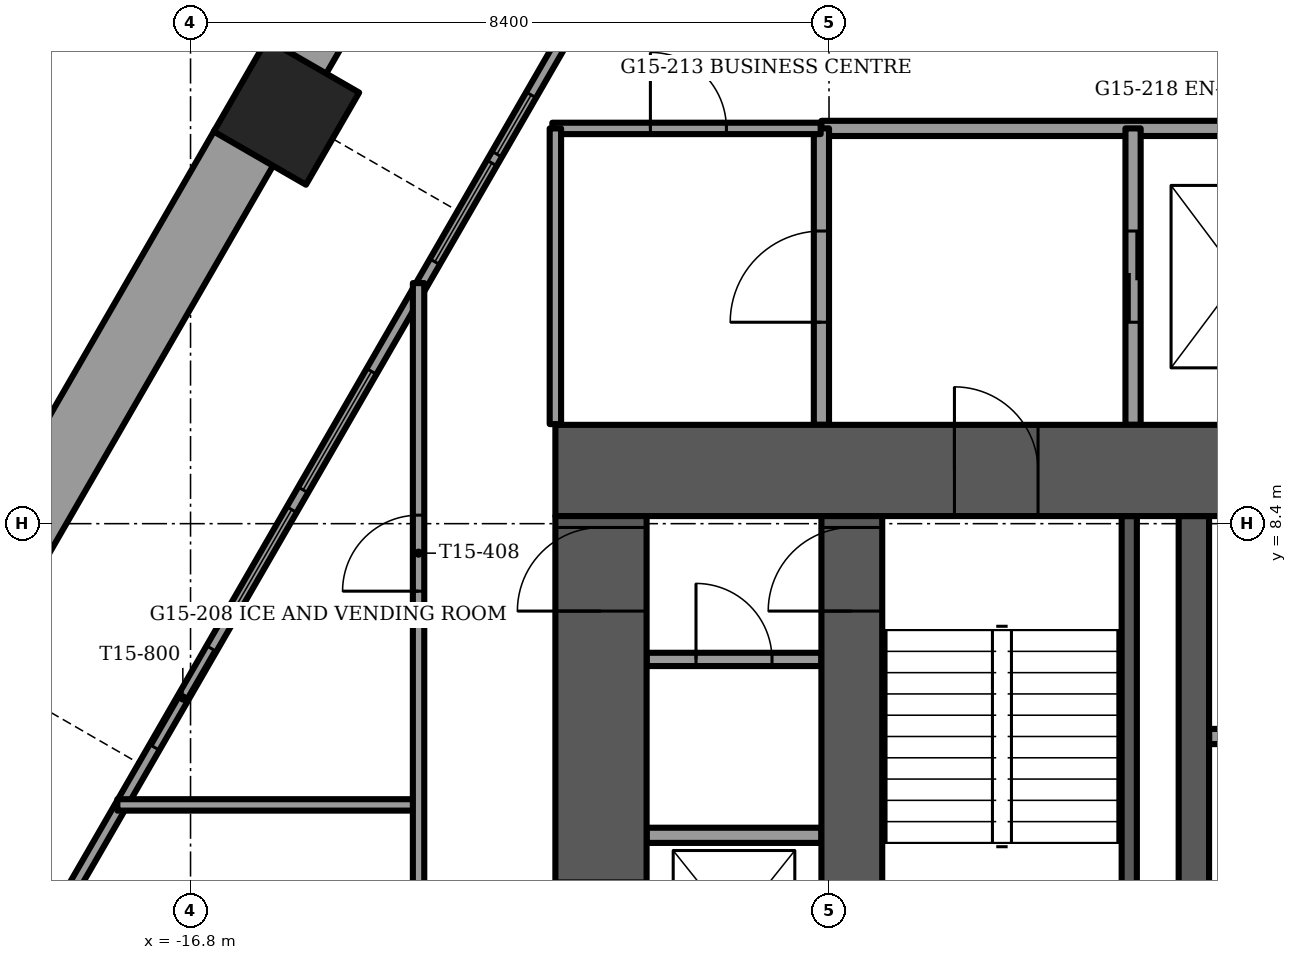
"""IFC4 building model, lengths in metres.
Left out: names, types, materials, properties, quantities, classifications, styles, units other than length and angle.
Written with IfcOpenShell. Run it as: python <this file> out.ifc"""

import sys

from ifc_helpers import new_model, si_unit, direction, frame, frame_2d, origin, origin_2d, place, context, subcontext, project, spatial, rectangle, extrude, element, fill, save


model = new_model("IFC4")
c1 = context("Model", 3, precision=1e-05, world=origin(), true_north=direction((0.0, 1.0)))
c2 = subcontext(c1, "Body", "Model", "MODEL_VIEW")
j1 = project(units=[si_unit("LENGTHUNIT", "METRE"), si_unit("PLANEANGLEUNIT", "RADIAN")], contexts=[c1])
p1 = place(None, origin())
s1 = spatial("IfcSite", under=j1, at=p1, CompositionType="ELEMENT")
p2 = place(p1, origin())
s2 = spatial("IfcBuilding", under=s1, at=p2, CompositionType="ELEMENT")
p3 = place(p2, frame((0.0, 0.0, 61.75)))
s3 = spatial("IfcBuildingStorey", under=s2, at=p3, CompositionType="ELEMENT", Elevation=61.75)
p4 = place(p3, frame((-15.538, 13.815, -1.2), z_axis=(0.0, 0.0, 1.0), x_axis=(0.5, 0.866025403784, 0.0)))
e1 = element("IfcColumn", 1, at=p4, inside=s3, PredefinedType="COLUMN", context=c2, shape_type="SweptSolid", body=[
    extrude(rectangle(XDim=1.4, YDim=1.4, at=origin_2d()), origin(), (0.0, 0.0, 1.0), 3.75),
])
p5 = place(p3, frame((-12.0, 9.1, -0.3), z_axis=(0.0, 0.0, 1.0), x_axis=(1.0, 0.0, 0.0)))
e2 = element("IfcWall", 2, at=p5, inside=s3, PredefinedType="SHEAR", context=c2, shape_type="SweptSolid", body=[
    extrude(rectangle(XDim=24.0, YDim=1.2, at=frame_2d((12.0, 0.0))), origin(), (0.0, 0.0, 1.0), 3.75),
])
p6 = place(p5, frame((11.2, 0.0, 0.0)))
e3 = element("IfcOpeningElement", 3, at=p6, cuts=e2, PredefinedType="OPENING", context=c2, shape_type="SweptSolid", body=[
    extrude(rectangle(XDim=1.6, YDim=2.1, at=frame_2d((0.8, 1.05))), frame((0.0, 0.6, 0.0), z_axis=(0.0, -1.0, 0.0), x_axis=(1.0, 0.0, 0.0)), (0.0, 0.0, 1.0), 1.2),
])
p7 = place(p5, frame((5.25, 0.0, 0.0)))
e4 = element("IfcOpeningElement", 4, at=p7, cuts=e2, PredefinedType="OPENING", context=c2, shape_type="SweptSolid", body=[
    extrude(rectangle(XDim=1.1, YDim=2.1, at=frame_2d((0.55, 1.05))), frame((0.0, 0.6, 0.0), z_axis=(0.0, -1.0, 0.0), x_axis=(1.0, 0.0, 0.0)), (0.0, 0.0, 1.0), 1.2),
])
p8 = place(p5, frame((17.65, 0.0, 0.0)))
e5 = element("IfcOpeningElement", 5, at=p8, cuts=e2, PredefinedType="OPENING", context=c2, shape_type="SweptSolid", body=[
    extrude(rectangle(XDim=1.1, YDim=2.1, at=frame_2d((0.55, 1.05))), frame((0.0, 0.6, 0.0), z_axis=(0.0, -1.0, 0.0), x_axis=(1.0, 0.0, 0.0)), (0.0, 0.0, 1.0), 1.2),
])
p9 = place(p3, frame((-8.1, -0.5, -0.3), z_axis=(0.0, 0.0, 1.0), x_axis=(0.0, 1.0, 0.0)))
e6 = element("IfcWall", 6, at=p9, inside=s3, PredefinedType="SHEAR", context=c2, shape_type="SweptSolid", body=[
    extrude(rectangle(XDim=9.0, YDim=0.8, at=frame_2d((4.5, 0.0))), origin(), (0.0, 0.0, 1.0), 3.75),
])
p10 = place(p9, frame((7.75, 0.0, 0.0)))
e7 = element("IfcOpeningElement", 7, at=p10, cuts=e6, PredefinedType="OPENING", context=c2, shape_type="SweptSolid", body=[
    extrude(rectangle(XDim=1.1, YDim=2.1, at=frame_2d((0.55, 1.05))), frame((0.0, 0.4, 0.0), z_axis=(0.0, -1.0, 0.0), x_axis=(1.0, 0.0, 0.0)), (0.0, 0.0, 1.0), 0.8),
])
p11 = place(p3, frame((-3.6, -0.5, -0.3), z_axis=(0.0, 0.0, 1.0), x_axis=(0.0, 1.0, 0.0)))
e8 = element("IfcWall", 8, at=p11, inside=s3, PredefinedType="SHEAR", context=c2, shape_type="SweptSolid", body=[
    extrude(rectangle(XDim=9.0, YDim=0.4, at=frame_2d((4.5, 0.0))), origin(), (0.0, 0.0, 1.0), 3.75),
])
p12 = place(p3, frame((-11.4, -0.5, -0.3), z_axis=(0.0, 0.0, 1.0), x_axis=(0.0, 1.0, 0.0)))
e9 = element("IfcWall", 9, at=p12, inside=s3, PredefinedType="SHEAR", context=c2, shape_type="SweptSolid", body=[
    extrude(rectangle(XDim=9.0, YDim=1.2, at=frame_2d((4.5, 0.0))), origin(), (0.0, 0.0, 1.0), 3.75),
])
p13 = place(p12, frame((7.75, 0.0, 0.0)))
e10 = element("IfcOpeningElement", 10, at=p13, cuts=e9, PredefinedType="OPENING", context=c2, shape_type="SweptSolid", body=[
    extrude(rectangle(XDim=1.1, YDim=2.1, at=frame_2d((0.55, 1.05))), frame((0.0, 0.6, 0.0), z_axis=(0.0, -1.0, 0.0), x_axis=(1.0, 0.0, 0.0)), (0.0, 0.0, 1.0), 1.2),
])
p14 = place(p12, frame((0.55, 0.0, 0.0)))
e11 = element("IfcOpeningElement", 11, at=p14, cuts=e9, PredefinedType="OPENING", context=c2, shape_type="SweptSolid", body=[
    extrude(rectangle(XDim=1.2, YDim=2.1, at=frame_2d((0.6, 1.05))), frame((0.0, 0.6, 0.0), z_axis=(0.0, -1.0, 0.0), x_axis=(1.0, 0.0, 0.0)), (0.0, 0.0, 1.0), 1.2),
])
p15 = place(p12, frame((3.0, 0.0, 0.0)))
e12 = element("IfcOpeningElement", 12, at=p15, cuts=e9, PredefinedType="OPENING", context=c2, shape_type="SweptSolid", body=[
    extrude(rectangle(XDim=1.2, YDim=2.1, at=frame_2d((0.6, 1.05))), frame((0.0, 0.6, 0.0), z_axis=(0.0, -1.0, 0.0), x_axis=(1.0, 0.0, 0.0)), (0.0, 0.0, 1.0), 1.2),
])
p16 = place(p3, frame((-11.855, 20.694, 0.0), z_axis=(0.0, 0.0, 1.0), x_axis=(-0.500013966327, -0.866017340172, 0.0)))
e13 = element("IfcWall", 13, at=p16, inside=s3, PredefinedType="PARAPET", context=c2, shape_type="SweptSolid", body=[
    extrude(rectangle(XDim=7.129, YDim=0.9, at=frame_2d((3.564, 0.0))), origin(), (0.0, 0.0, 1.0), 1.1),
])
p17 = place(p3, frame((-16.089, 13.36, 0.0), z_axis=(0.0, 0.0, 1.0), x_axis=(-0.499997206141, -0.866027016814, 0.0)))
e14 = element("IfcWall", 14, at=p17, inside=s3, PredefinedType="PARAPET", context=c2, shape_type="SweptSolid", body=[
    extrude(rectangle(XDim=7.051, YDim=0.9, at=frame_2d((3.525, 0.0))), origin(), (0.0, 0.0, 1.0), 1.1),
])
p18 = place(p3, frame((-8.709, 20.292, 0.0), z_axis=(0.0, 0.0, 1.0), x_axis=(-0.500005515081, -0.866022219628, 0.0)))
e15 = element("IfcWall", 15, at=p18, inside=s3, PredefinedType="SOLIDWALL", context=c2, shape_type="SweptSolid", body=[
    extrude(rectangle(XDim=23.667, YDim=0.15, at=frame_2d((11.833, 0.0))), origin(), (0.0, 0.0, 1.0), 3.45),
])
p19 = place(p18, frame((3.825, 0.0, 0.15)))
e16 = element("IfcOpeningElement", 16, at=p19, cuts=e15, PredefinedType="OPENING", context=c2, shape_type="SweptSolid", body=[
    extrude(rectangle(XDim=1.5, YDim=2.85, at=frame_2d((0.75, 1.425))), frame((0.0, 0.075, 0.0), z_axis=(0.0, -1.0, 0.0), x_axis=(1.0, 0.0, 0.0)), (0.0, 0.0, 1.0), 0.15),
])
p20 = place(p18, frame((7.219, 0.0, 0.15)))
e17 = element("IfcOpeningElement", 17, at=p20, cuts=e15, PredefinedType="OPENING", context=c2, shape_type="SweptSolid", body=[
    extrude(rectangle(XDim=0.9, YDim=2.85, at=frame_2d((0.45, 1.425))), frame((0.0, 0.075, 0.0), z_axis=(0.0, -1.0, 0.0), x_axis=(1.0, 0.0, 0.0)), (0.0, 0.0, 1.0), 0.15),
])
p21 = place(p18, frame((8.254, 0.0, 0.15)))
e18 = element("IfcOpeningElement", 18, at=p21, cuts=e15, PredefinedType="OPENING", context=c2, shape_type="SweptSolid", body=[
    extrude(rectangle(XDim=1.5, YDim=2.85, at=frame_2d((0.75, 1.425))), frame((0.0, 0.075, 0.0), z_axis=(0.0, -1.0, 0.0), x_axis=(1.0, 0.0, 0.0)), (0.0, 0.0, 1.0), 0.15),
])
p22 = place(p18, frame((11.419, 0.0, 0.15)))
e19 = element("IfcOpeningElement", 19, at=p22, cuts=e15, PredefinedType="OPENING", context=c2, shape_type="SweptSolid", body=[
    extrude(rectangle(XDim=1.8, YDim=2.85, at=frame_2d((0.9, 1.425))), frame((0.0, 0.075, 0.0), z_axis=(0.0, -1.0, 0.0), x_axis=(1.0, 0.0, 0.0)), (0.0, 0.0, 1.0), 0.15),
])
p23 = place(p18, frame((13.519, 0.0, 0.15)))
e20 = element("IfcOpeningElement", 20, at=p23, cuts=e15, PredefinedType="OPENING", context=c2, shape_type="SweptSolid", body=[
    extrude(rectangle(XDim=1.5, YDim=2.85, at=frame_2d((0.75, 1.425))), frame((0.0, 0.075, 0.0), z_axis=(0.0, -1.0, 0.0), x_axis=(1.0, 0.0, 0.0)), (0.0, 0.0, 1.0), 0.15),
])
p24 = place(p18, frame((15.63, 0.0, 0.0)))
e21 = element("IfcOpeningElement", 21, at=p24, cuts=e15, PredefinedType="OPENING", context=c2, shape_type="SweptSolid", body=[
    extrude(rectangle(XDim=1.5, YDim=2.4, at=frame_2d((0.75, 1.2))), frame((0.0, 0.075, 0.0), z_axis=(0.0, -1.0, 0.0), x_axis=(1.0, 0.0, 0.0)), (0.0, 0.0, 1.0), 0.15),
])
p25 = place(p18, frame((0.41, 0.0, 0.15)))
e22 = element("IfcOpeningElement", 22, at=p25, cuts=e15, PredefinedType="OPENING", context=c2, shape_type="SweptSolid", body=[
    extrude(rectangle(XDim=1.8, YDim=2.73, at=frame_2d((0.9, 1.365))), frame((0.0, 0.075, 0.0), z_axis=(0.0, -1.0, 0.0), x_axis=(1.0, 0.0, 0.0)), (0.0, 0.0, 1.0), 0.15),
])
p26 = place(p18, frame((20.743, 0.0, 0.15)))
e23 = element("IfcOpeningElement", 23, at=p26, cuts=e15, PredefinedType="OPENING", context=c2, shape_type="SweptSolid", body=[
    extrude(rectangle(XDim=1.8, YDim=2.73, at=frame_2d((0.9, 1.365))), frame((0.0, 0.075, 0.0), z_axis=(0.0, -1.0, 0.0), x_axis=(1.0, 0.0, 0.0)), (0.0, 0.0, 1.0), 0.15),
])
p27 = place(p3, frame((-3.4, 5.6, 0.0), z_axis=(0.0, 0.0, 1.0), x_axis=(1.0, 0.0, 0.0)))
e24 = element("IfcWall", 24, at=p27, inside=s3, PredefinedType="PARTITIONING", context=c2, shape_type="SweptSolid", body=[
    extrude(rectangle(XDim=2.3, YDim=0.2, at=frame_2d((1.15, 0.0))), origin(), (0.0, 0.0, 1.0), 3.45),
])
p28 = place(p3, frame((-4.45, 0.9, -0.3), z_axis=(0.0, 0.0, 1.0), x_axis=(0.0, 1.0, 0.0)))
e25 = element("IfcWall", 25, at=p28, inside=s3, PredefinedType="SOLIDWALL", context=c2, shape_type="SweptSolid", body=[
    extrude(rectangle(XDim=7.6, YDim=0.2, at=frame_2d((3.8, 0.0))), origin(), (0.0, 0.0, 1.0), 3.75),
])
p29 = place(p3, frame((-8.5, 13.6, 0.0), z_axis=(0.0, 0.0, 1.0), x_axis=(1.0, 0.0, 0.0)))
e26 = element("IfcWall", 26, at=p29, inside=s3, PredefinedType="PARTITIONING", context=c2, shape_type="SweptSolid", body=[
    extrude(rectangle(XDim=17.0, YDim=0.2, at=frame_2d((8.5, 0.0))), origin(), (0.0, 0.0, 1.0), 3.45),
])
p30 = place(p29, frame((8.0, 0.0, 0.0)))
e27 = element("IfcOpeningElement", 27, at=p30, cuts=e26, PredefinedType="OPENING", context=c2, shape_type="SweptSolid", body=[
    extrude(rectangle(XDim=1.0, YDim=2.1, at=frame_2d((0.5, 1.05))), frame((0.0, 0.1, 0.0), z_axis=(0.0, -1.0, 0.0), x_axis=(1.0, 0.0, 0.0)), (0.0, 0.0, 1.0), 0.2),
])
p31 = place(p3, frame((-8.5, 9.7, 0.0), z_axis=(0.0, 0.0, 1.0), x_axis=(0.0, 1.0, 0.0)))
e28 = element("IfcWall", 28, at=p31, inside=s3, PredefinedType="PARTITIONING", context=c2, shape_type="SweptSolid", body=[
    extrude(rectangle(XDim=3.9, YDim=0.2, at=frame_2d((1.95, 0.0))), origin(), (0.0, 0.0, 1.0), 3.45),
])
p32 = place(p31, frame((1.35, 0.0, 0.0)))
e29 = element("IfcOpeningElement", 29, at=p32, cuts=e28, PredefinedType="OPENING", context=c2, shape_type="SweptSolid", body=[
    extrude(rectangle(XDim=1.2, YDim=2.1, at=frame_2d((0.6, 1.05))), frame((0.0, 0.1, 0.0), z_axis=(0.0, -1.0, 0.0), x_axis=(1.0, 0.0, 0.0)), (0.0, 0.0, 1.0), 0.2),
])
p33 = place(p3, frame((-4.4, 9.7, 0.0), z_axis=(0.0, 0.0, 1.0), x_axis=(0.0, 1.0, 0.0)))
e30 = element("IfcWall", 30, at=p33, inside=s3, PredefinedType="PARTITIONING", context=c2, shape_type="SweptSolid", body=[
    extrude(rectangle(XDim=3.9, YDim=0.2, at=frame_2d((1.95, 0.0))), origin(), (0.0, 0.0, 1.0), 3.45),
])
p34 = place(p33, frame((1.35, 0.0, 0.0)))
e31 = element("IfcOpeningElement", 31, at=p34, cuts=e30, PredefinedType="OPENING", context=c2, shape_type="SweptSolid", body=[
    extrude(rectangle(XDim=1.2, YDim=2.1, at=frame_2d((0.6, 1.05))), frame((0.0, 0.1, 0.0), z_axis=(0.0, -1.0, 0.0), x_axis=(1.0, 0.0, 0.0)), (0.0, 0.0, 1.0), 0.2),
])
p35 = place(p3, frame((-10.8, 4.3, 0.0), z_axis=(0.0, 0.0, 1.0), x_axis=(1.0, 0.0, 0.0)))
e32 = element("IfcWall", 32, at=p35, inside=s3, PredefinedType="PARTITIONING", context=c2, shape_type="SweptSolid", body=[
    extrude(rectangle(XDim=2.3, YDim=0.2, at=frame_2d((1.15, 0.0))), origin(), (0.0, 0.0, 1.0), 3.45),
])
p36 = place(p3, frame((-10.8, 6.614, 0.0), z_axis=(0.0, 0.0, 1.0), x_axis=(1.0, 0.0, 0.0)))
e33 = element("IfcWall", 33, at=p36, inside=s3, PredefinedType="PARTITIONING", context=c2, shape_type="SweptSolid", body=[
    extrude(rectangle(XDim=2.3, YDim=0.175, at=frame_2d((1.15, 0.0))), origin(), (0.0, 0.0, 1.0), 3.45),
])
p37 = place(p36, frame((0.65, 0.0, 0.0)))
e34 = element("IfcOpeningElement", 34, at=p37, cuts=e33, PredefinedType="OPENING", context=c2, shape_type="SweptSolid", body=[
    extrude(rectangle(XDim=1.0, YDim=2.1, at=frame_2d((0.5, 1.05))), frame((0.0, 0.087, 0.0), z_axis=(0.0, -1.0, 0.0), x_axis=(1.0, 0.0, 0.0)), (0.0, 0.0, 1.0), 0.175),
])
p38 = place(p3, frame((-17.763, 4.7, 0.0), z_axis=(0.0, 0.0, 1.0), x_axis=(1.0, 0.0, 0.0)))
e35 = element("IfcWall", 35, at=p38, inside=s3, PredefinedType="PARTITIONING", context=c2, shape_type="SweptSolid", body=[
    extrude(rectangle(XDim=3.963, YDim=0.15, at=frame_2d((1.981, 0.0))), origin(), (0.0, 0.0, 1.0), 3.45),
])
p39 = place(p3, frame((-12.04, 13.6, 0.0), z_axis=(0.0, 0.0, 1.0), x_axis=(1.0, 0.0, 0.0)))
e36 = element("IfcWall", 36, at=p39, inside=s3, PredefinedType="PARTITIONING", context=c2, shape_type="SweptSolid", body=[
    extrude(rectangle(XDim=3.53, YDim=0.15, at=frame_2d((1.765, 0.0))), origin(), (0.0, 0.0, 1.0), 3.45),
])
p40 = place(p39, frame((1.29, 0.0, 0.0)))
e37 = element("IfcOpeningElement", 37, at=p40, cuts=e36, PredefinedType="OPENING", context=c2, shape_type="SweptSolid", body=[
    extrude(rectangle(XDim=1.0, YDim=2.1, at=frame_2d((0.5, 1.05))), frame((0.0, 0.075, 0.0), z_axis=(0.0, -1.0, 0.0), x_axis=(1.0, 0.0, 0.0)), (0.0, 0.0, 1.0), 0.15),
])
p41 = place(p3, frame((-12.0, 9.71, 0.0), z_axis=(0.0, 0.0, 1.0), x_axis=(0.0, 1.0, 0.0)))
e38 = element("IfcWall", 38, at=p41, inside=s3, PredefinedType="PARTITIONING", context=c2, shape_type="SweptSolid", body=[
    extrude(rectangle(XDim=3.89, YDim=0.15, at=frame_2d((1.945, 0.0))), origin(), (0.0, 0.0, 1.0), 3.45),
])
p42 = place(p3, frame((-13.8, -3.7, 0.0), z_axis=(0.0, 0.0, 1.0), x_axis=(0.0, 1.0, 0.0)))
e39 = element("IfcWall", 39, at=p42, inside=s3, PredefinedType="PARTITIONING", context=c2, shape_type="SweptSolid", body=[
    extrude(rectangle(XDim=15.265, YDim=0.15, at=frame_2d((7.632, 0.0))), origin(), (0.0, 0.0, 1.0), 3.45),
])
p43 = place(p42, frame((4.263, 0.0, 0.0)))
e40 = element("IfcOpeningElement", 40, at=p43, cuts=e39, PredefinedType="OPENING", context=c2, shape_type="SweptSolid", body=[
    extrude(rectangle(XDim=1.0, YDim=2.1, at=frame_2d((0.5, 1.05))), frame((0.0, 0.075, 0.0), z_axis=(0.0, -1.0, 0.0), x_axis=(1.0, 0.0, 0.0)), (0.0, 0.0, 1.0), 0.15),
])
p44 = place(p42, frame((11.212, 0.0, 0.0)))
e41 = element("IfcOpeningElement", 41, at=p44, cuts=e39, PredefinedType="OPENING", context=c2, shape_type="SweptSolid", body=[
    extrude(rectangle(XDim=1.0, YDim=2.1, at=frame_2d((0.5, 1.05))), frame((0.0, 0.075, 0.0), z_axis=(0.0, -1.0, 0.0), x_axis=(1.0, 0.0, 0.0)), (0.0, 0.0, 1.0), 0.15),
])
p45 = place(p20, origin())
e42 = element("IfcWindow", 42, at=p45, inside=s3, PartitioningType="SINGLE_PANEL", PredefinedType="WINDOW", context=c2, shape_type="SweptSolid", body=[
    extrude(rectangle(XDim=0.9, YDim=2.85, at=frame_2d((0.45, 1.425))), frame((0.0, 0.03, 0.0), z_axis=(0.0, -1.0, 0.0), x_axis=(1.0, 0.0, 0.0)), (0.0, 0.0, 1.0), 0.06),
])
fill(e17, e42)
p46 = place(p21, origin())
e43 = element("IfcWindow", 43, at=p46, inside=s3, PartitioningType="SINGLE_PANEL", PredefinedType="WINDOW", context=c2, shape_type="SweptSolid", body=[
    extrude(rectangle(XDim=1.5, YDim=2.85, at=frame_2d((0.75, 1.425))), frame((0.0, 0.03, 0.0), z_axis=(0.0, -1.0, 0.0), x_axis=(1.0, 0.0, 0.0)), (0.0, 0.0, 1.0), 0.06),
])
fill(e18, e43)
p47 = place(p22, origin())
e44 = element("IfcWindow", 44, at=p47, inside=s3, PartitioningType="SINGLE_PANEL", PredefinedType="WINDOW", context=c2, shape_type="SweptSolid", body=[
    extrude(rectangle(XDim=1.8, YDim=2.85, at=frame_2d((0.9, 1.425))), frame((0.0, 0.03, 0.0), z_axis=(0.0, -1.0, 0.0), x_axis=(1.0, 0.0, 0.0)), (0.0, 0.0, 1.0), 0.06),
])
fill(e19, e44)
p48 = place(p23, origin())
e45 = element("IfcWindow", 45, at=p48, inside=s3, PartitioningType="SINGLE_PANEL", PredefinedType="WINDOW", context=c2, shape_type="SweptSolid", body=[
    extrude(rectangle(XDim=1.5, YDim=2.85, at=frame_2d((0.75, 1.425))), frame((0.0, 0.03, 0.0), z_axis=(0.0, -1.0, 0.0), x_axis=(1.0, 0.0, 0.0)), (0.0, 0.0, 1.0), 0.06),
])
fill(e20, e45)
p49 = place(p24, origin())
e46 = element("IfcDoor", 46, at=p49, inside=s3, OperationType="SLIDING_TO_RIGHT", PredefinedType="DOOR", context=c2, shape_type="SweptSolid", body=[
    extrude(rectangle(XDim=1.5, YDim=2.4, at=frame_2d((0.75, 1.2))), frame((0.0, 0.025, 0.0), z_axis=(0.0, -1.0, 0.0), x_axis=(1.0, 0.0, 0.0)), (0.0, 0.0, 1.0), 0.05),
])
fill(e21, e46)
p50 = place(p7, origin())
e47 = element("IfcDoor", 47, at=p50, inside=s3, OperationType="SINGLE_SWING_LEFT", PredefinedType="DOOR", context=c2, shape_type="SweptSolid", body=[
    extrude(rectangle(XDim=1.1, YDim=2.1, at=frame_2d((0.55, 1.05))), frame((0.0, 0.025, 0.0), z_axis=(0.0, -1.0, 0.0), x_axis=(1.0, 0.0, 0.0)), (0.0, 0.0, 1.0), 0.05),
])
fill(e4, e47)
p51 = place(p10, origin())
e48 = element("IfcDoor", 48, at=p51, inside=s3, OperationType="SINGLE_SWING_RIGHT", PredefinedType="DOOR", context=c2, shape_type="SweptSolid", body=[
    extrude(rectangle(XDim=1.1, YDim=2.1, at=frame_2d((0.55, 1.05))), frame((0.0, 0.025, 0.0), z_axis=(0.0, -1.0, 0.0), x_axis=(1.0, 0.0, 0.0)), (0.0, 0.0, 1.0), 0.05),
])
fill(e7, e48)
p52 = place(p34, origin())
e49 = element("IfcDoor", 49, at=p52, inside=s3, OperationType="SLIDING_TO_LEFT", PredefinedType="DOOR", context=c2, shape_type="SweptSolid", body=[
    extrude(rectangle(XDim=1.2, YDim=2.1, at=frame_2d((0.6, 1.05))), frame((0.0, 0.025, 0.0), z_axis=(0.0, -1.0, 0.0), x_axis=(1.0, 0.0, 0.0)), (0.0, 0.0, 1.0), 0.05),
])
fill(e31, e49)
p53 = place(p32, origin())
e50 = element("IfcDoor", 50, at=p53, inside=s3, OperationType="SINGLE_SWING_LEFT", PredefinedType="DOOR", context=c2, shape_type="SweptSolid", body=[
    extrude(rectangle(XDim=1.2, YDim=2.1, at=frame_2d((0.6, 1.05))), frame((0.0, 0.025, 0.0), z_axis=(0.0, -1.0, 0.0), x_axis=(1.0, 0.0, 0.0)), (0.0, 0.0, 1.0), 0.05),
])
fill(e29, e50)
p54 = place(p37, origin())
e51 = element("IfcDoor", 51, at=p54, inside=s3, OperationType="SINGLE_SWING_LEFT", PredefinedType="DOOR", context=c2, shape_type="SweptSolid", body=[
    extrude(rectangle(XDim=1.0, YDim=2.1, at=frame_2d((0.5, 1.05))), frame((0.0, 0.025, 0.0), z_axis=(0.0, -1.0, 0.0), x_axis=(1.0, 0.0, 0.0)), (0.0, 0.0, 1.0), 0.05),
])
fill(e34, e51)
p55 = place(p13, origin())
e52 = element("IfcDoor", 52, at=p55, inside=s3, OperationType="SINGLE_SWING_LEFT", PredefinedType="DOOR", context=c2, shape_type="SweptSolid", body=[
    extrude(rectangle(XDim=1.1, YDim=2.1, at=frame_2d((0.55, 1.05))), frame((0.0, 0.025, 0.0), z_axis=(0.0, -1.0, 0.0), x_axis=(1.0, 0.0, 0.0)), (0.0, 0.0, 1.0), 0.05),
])
fill(e10, e52)
p56 = place(p15, origin())
e53 = element("IfcDoor", 53, at=p56, inside=s3, OperationType="SLIDING_TO_LEFT", PredefinedType="DOOR", context=c2, shape_type="SweptSolid", body=[
    extrude(rectangle(XDim=1.2, YDim=2.1, at=frame_2d((0.6, 1.05))), frame((0.0, 0.025, 0.0), z_axis=(0.0, -1.0, 0.0), x_axis=(1.0, 0.0, 0.0)), (0.0, 0.0, 1.0), 0.05),
])
fill(e12, e53)
p57 = place(p44, origin())
e54 = element("IfcDoor", 54, at=p57, inside=s3, OperationType="SINGLE_SWING_LEFT", PredefinedType="DOOR", context=c2, shape_type="SweptSolid", body=[
    extrude(rectangle(XDim=1.0, YDim=2.1, at=frame_2d((0.5, 1.05))), frame((0.0, 0.025, 0.0), z_axis=(0.0, -1.0, 0.0), x_axis=(1.0, 0.0, 0.0)), (0.0, 0.0, 1.0), 0.05),
])
fill(e41, e54)
p58 = place(p40, origin())
e55 = element("IfcDoor", 55, at=p58, inside=s3, OperationType="SINGLE_SWING_RIGHT", PredefinedType="DOOR", context=c2, shape_type="SweptSolid", body=[
    extrude(rectangle(XDim=1.0, YDim=2.1, at=frame_2d((0.5, 1.05))), frame((0.0, 0.025, 0.0), z_axis=(0.0, -1.0, 0.0), x_axis=(1.0, 0.0, 0.0)), (0.0, 0.0, 1.0), 0.05),
])
fill(e37, e55)
save(model, sys.argv[1])
